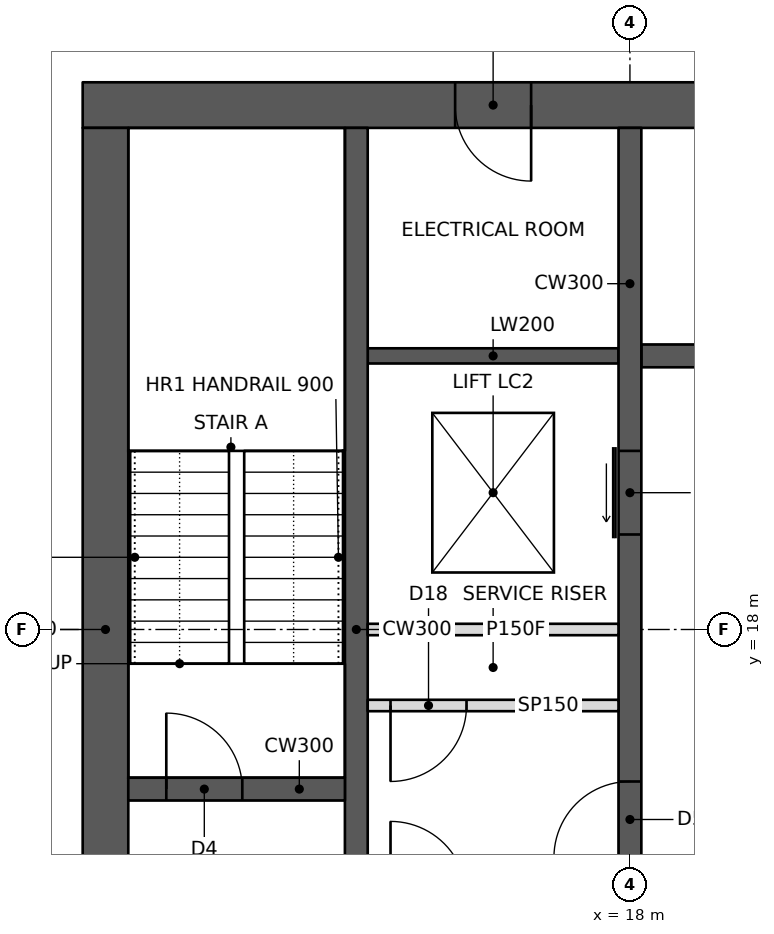
"""IFC4 building model, lengths in metres.
Left out: names, types, materials, properties, quantities, classifications, styles, units other than length and angle.
Written with IfcOpenShell. Run it as: python <this file> out.ifc"""

import sys

from ifc_helpers import new_model, si_unit, direction, frame, frame_2d, origin, place, context, subcontext, project, spatial, rectangle, extrude, element, fill, save


model = new_model("IFC4")
c1 = context("Model", 3, precision=1e-05, world=origin(), true_north=direction((0.0, 1.0)))
c2 = subcontext(c1, "Body", "Model", "MODEL_VIEW")
j1 = project(units=[si_unit("LENGTHUNIT", "METRE"), si_unit("PLANEANGLEUNIT", "RADIAN")], contexts=[c1])
p1 = place(None, origin())
s1 = spatial("IfcSite", under=j1, at=p1, CompositionType="ELEMENT")
p2 = place(p1, origin())
s2 = spatial("IfcBuilding", under=s1, at=p2, CompositionType="ELEMENT")
p3 = place(p2, frame((0.0, 0.0, 237.4)))
s3 = spatial("IfcBuildingStorey", under=s2, at=p3, CompositionType="ELEMENT", Elevation=237.4)
p4 = place(p3, frame((10.8, 24.9, 0.0), z_axis=(0.0, 0.0, 1.0), x_axis=(1.0, 0.0, 0.0)))
e1 = element("IfcWall", 1, at=p4, inside=s3, PredefinedType="SHEAR", context=c2, shape_type="SweptSolid", body=[
    extrude(rectangle(XDim=23.4, YDim=0.6, at=frame_2d((11.7, 0.0))), origin(), (0.0, 0.0, 1.0), 3.6),
])
p5 = place(p4, frame((17.2, 0.0, 0.0)))
e2 = element("IfcOpeningElement", 2, at=p5, cuts=e1, PredefinedType="OPENING", context=c2, shape_type="SweptSolid", body=[
    extrude(rectangle(XDim=1.8, YDim=2.1, at=frame_2d((0.9, 1.05))), frame((0.0, 0.31, 0.0), z_axis=(0.0, -1.0, 0.0), x_axis=(1.0, 0.0, 0.0)), (0.0, 0.0, 1.0), 0.62),
])
p6 = place(p4, frame((21.1, 0.0, 0.0)))
e3 = element("IfcOpeningElement", 3, at=p6, cuts=e1, PredefinedType="OPENING", context=c2, shape_type="SweptSolid", body=[
    extrude(rectangle(XDim=1.0, YDim=2.1, at=frame_2d((0.5, 1.05))), frame((0.0, 0.31, 0.0), z_axis=(0.0, -1.0, 0.0), x_axis=(1.0, 0.0, 0.0)), (0.0, 0.0, 1.0), 0.62),
])
p7 = place(p4, frame((4.9, 0.0, 0.0)))
e4 = element("IfcOpeningElement", 4, at=p7, cuts=e1, PredefinedType="OPENING", context=c2, shape_type="SweptSolid", body=[
    extrude(rectangle(XDim=1.0, YDim=2.1, at=frame_2d((0.5, 1.05))), frame((0.0, 0.31, 0.0), z_axis=(0.0, -1.0, 0.0), x_axis=(1.0, 0.0, 0.0)), (0.0, 0.0, 1.0), 0.62),
])
p8 = place(p3, frame((11.1, 11.4, 0.0), z_axis=(0.0, 0.0, 1.0), x_axis=(0.0, 1.0, 0.0)))
e5 = element("IfcWall", 5, at=p8, inside=s3, PredefinedType="SHEAR", context=c2, shape_type="SweptSolid", body=[
    extrude(rectangle(XDim=13.2, YDim=0.6, at=frame_2d((6.6, 0.0))), origin(), (0.0, 0.0, 1.0), 3.6),
])
p9 = place(p3, frame((14.4, 11.4, 0.0), z_axis=(0.0, 0.0, 1.0), x_axis=(0.0, 1.0, 0.0)))
e6 = element("IfcWall", 6, at=p9, inside=s3, PredefinedType="SHEAR", context=c2, shape_type="SweptSolid", body=[
    extrude(rectangle(XDim=13.2, YDim=0.3, at=frame_2d((6.6, 0.0))), origin(), (0.0, 0.0, 1.0), 3.6),
])
p10 = place(p3, frame((11.4, 15.9, 0.0), z_axis=(0.0, 0.0, 1.0), x_axis=(1.0, 0.0, 0.0)))
e7 = element("IfcWall", 7, at=p10, inside=s3, PredefinedType="SHEAR", context=c2, shape_type="SweptSolid", body=[
    extrude(rectangle(XDim=2.85, YDim=0.3, at=frame_2d((1.425, 0.0))), origin(), (0.0, 0.0, 1.0), 3.6),
])
p11 = place(p10, frame((0.5, 0.0, 0.0)))
e8 = element("IfcOpeningElement", 8, at=p11, cuts=e7, PredefinedType="OPENING", context=c2, shape_type="SweptSolid", body=[
    extrude(rectangle(XDim=1.0, YDim=2.1, at=frame_2d((0.5, 1.05))), frame((0.0, 0.16, 0.0), z_axis=(0.0, -1.0, 0.0), x_axis=(1.0, 0.0, 0.0)), (0.0, 0.0, 1.0), 0.32),
])
p12 = place(p3, frame((18.0, 11.4, 0.0), z_axis=(0.0, 0.0, 1.0), x_axis=(0.0, 1.0, 0.0)))
e9 = element("IfcWall", 9, at=p12, inside=s3, PredefinedType="SHEAR", context=c2, shape_type="SweptSolid", body=[
    extrude(rectangle(XDim=13.2, YDim=0.3, at=frame_2d((6.6, 0.0))), origin(), (0.0, 0.0, 1.0), 3.6),
])
p13 = place(p12, frame((3.6, 0.0, 0.0)))
e10 = element("IfcOpeningElement", 10, at=p13, cuts=e9, PredefinedType="OPENING", context=c2, shape_type="SweptSolid", body=[
    extrude(rectangle(XDim=1.0, YDim=2.1, at=frame_2d((0.5, 1.05))), frame((0.0, 0.16, 0.0), z_axis=(0.0, -1.0, 0.0), x_axis=(1.0, 0.0, 0.0)), (0.0, 0.0, 1.0), 0.32),
])
p14 = place(p12, frame((7.85, 0.0, 0.0)))
e11 = element("IfcOpeningElement", 11, at=p14, cuts=e9, PredefinedType="OPENING", context=c2, shape_type="SweptSolid", body=[
    extrude(rectangle(XDim=1.1, YDim=2.1, at=frame_2d((0.55, 1.05))), frame((0.0, 0.16, 0.0), z_axis=(0.0, -1.0, 0.0), x_axis=(1.0, 0.0, 0.0)), (0.0, 0.0, 1.0), 0.32),
])
p15 = place(p3, frame((14.55, 18.0, 0.0), z_axis=(0.0, 0.0, 1.0), x_axis=(1.0, 0.0, 0.0)))
e12 = element("IfcWall", 12, at=p15, inside=s3, PredefinedType="PARTITIONING", context=c2, shape_type="SweptSolid", body=[
    extrude(rectangle(XDim=3.3, YDim=0.15, at=frame_2d((1.65, 0.0))), origin(), (0.0, 0.0, 1.0), 3.4),
])
p16 = place(p3, frame((18.15, 21.6, 0.0), z_axis=(0.0, 0.0, 1.0), x_axis=(1.0, 0.0, 0.0)))
e13 = element("IfcWall", 13, at=p16, inside=s3, PredefinedType="SHEAR", context=c2, shape_type="SweptSolid", body=[
    extrude(rectangle(XDim=9.0, YDim=0.3, at=frame_2d((4.5, 0.0))), origin(), (0.0, 0.0, 1.0), 3.6),
])
p17 = place(p16, frame((6.75, 0.0, 0.0)))
e14 = element("IfcOpeningElement", 14, at=p17, cuts=e13, PredefinedType="OPENING", context=c2, shape_type="SweptSolid", body=[
    extrude(rectangle(XDim=1.2, YDim=2.1, at=frame_2d((0.6, 1.05))), frame((0.0, 0.16, 0.0), z_axis=(0.0, -1.0, 0.0), x_axis=(1.0, 0.0, 0.0)), (0.0, 0.0, 1.0), 0.32),
])
p18 = place(p16, frame((0.8, 0.0, 0.0)))
e15 = element("IfcOpeningElement", 15, at=p18, cuts=e13, PredefinedType="OPENING", context=c2, shape_type="SweptSolid", body=[
    extrude(rectangle(XDim=1.1, YDim=2.1, at=frame_2d((0.55, 1.05))), frame((0.0, 0.16, 0.0), z_axis=(0.0, -1.0, 0.0), x_axis=(1.0, 0.0, 0.0)), (0.0, 0.0, 1.0), 0.32),
])
p19 = place(p16, frame((3.8, 0.0, 0.0)))
e16 = element("IfcOpeningElement", 16, at=p19, cuts=e13, PredefinedType="OPENING", context=c2, shape_type="SweptSolid", body=[
    extrude(rectangle(XDim=1.1, YDim=2.1, at=frame_2d((0.55, 1.05))), frame((0.0, 0.16, 0.0), z_axis=(0.0, -1.0, 0.0), x_axis=(1.0, 0.0, 0.0)), (0.0, 0.0, 1.0), 0.32),
])
p20 = place(p3, frame((14.55, 21.6, 0.0), z_axis=(0.0, 0.0, 1.0), x_axis=(1.0, 0.0, 0.0)))
e17 = element("IfcWall", 17, at=p20, inside=s3, PredefinedType="SHEAR", context=c2, shape_type="SweptSolid", body=[
    extrude(rectangle(XDim=3.3, YDim=0.2, at=frame_2d((1.65, 0.0))), origin(), (0.0, 0.0, 1.0), 3.6),
])
p21 = place(p3, frame((14.55, 17.0, 0.0), z_axis=(0.0, 0.0, 1.0), x_axis=(1.0, 0.0, 0.0)))
e18 = element("IfcWall", 18, at=p21, inside=s3, PredefinedType="PARTITIONING", context=c2, shape_type="SweptSolid", body=[
    extrude(rectangle(XDim=3.3, YDim=0.15, at=frame_2d((1.65, 0.0))), origin(), (0.0, 0.0, 1.0), 3.4),
])
p22 = place(p21, frame((0.3, 0.0, 0.0)))
e19 = element("IfcOpeningElement", 19, at=p22, cuts=e18, PredefinedType="OPENING", context=c2, shape_type="SweptSolid", body=[
    extrude(rectangle(XDim=1.0, YDim=2.1, at=frame_2d((0.5, 1.05))), frame((0.0, 0.085, 0.0), z_axis=(0.0, -1.0, 0.0), x_axis=(1.0, 0.0, 0.0)), (0.0, 0.0, 1.0), 0.17),
])
p23 = place(p22, frame((1.0, 0.0, 0.0), z_axis=(0.0, 0.0, 1.0), x_axis=(-1.0, 0.0, 0.0)))
e20 = element("IfcDoor", 20, at=p23, inside=s3, OperationType="SINGLE_SWING_RIGHT", PredefinedType="DOOR", context=c2, shape_type="SweptSolid", body=[
    extrude(rectangle(XDim=1.0, YDim=2.1, at=frame_2d((0.5, 1.05))), frame((0.0, 0.025, 0.0), z_axis=(0.0, -1.0, 0.0), x_axis=(1.0, 0.0, 0.0)), (0.0, 0.0, 1.0), 0.05),
])
fill(e19, e20)
p24 = place(p11, origin())
e21 = element("IfcDoor", 21, at=p24, inside=s3, OperationType="SINGLE_SWING_LEFT", PredefinedType="DOOR", context=c2, shape_type="SweptSolid", body=[
    extrude(rectangle(XDim=1.0, YDim=2.1, at=frame_2d((0.5, 1.05))), frame((0.0, 0.025, 0.0), z_axis=(0.0, -1.0, 0.0), x_axis=(1.0, 0.0, 0.0)), (0.0, 0.0, 1.0), 0.05),
])
fill(e8, e21)
p25 = place(p13, origin())
e22 = element("IfcDoor", 22, at=p25, inside=s3, OperationType="SINGLE_SWING_LEFT", PredefinedType="DOOR", context=c2, shape_type="SweptSolid", body=[
    extrude(rectangle(XDim=1.0, YDim=2.1, at=frame_2d((0.5, 1.05))), frame((0.0, 0.025, 0.0), z_axis=(0.0, -1.0, 0.0), x_axis=(1.0, 0.0, 0.0)), (0.0, 0.0, 1.0), 0.05),
])
fill(e10, e22)
p26 = place(p7, frame((1.0, 0.0, 0.0), z_axis=(0.0, 0.0, 1.0), x_axis=(-1.0, 0.0, 0.0)))
e23 = element("IfcDoor", 23, at=p26, inside=s3, OperationType="SINGLE_SWING_LEFT", PredefinedType="DOOR", context=c2, shape_type="SweptSolid", body=[
    extrude(rectangle(XDim=1.0, YDim=2.1, at=frame_2d((0.5, 1.05))), frame((0.0, 0.025, 0.0), z_axis=(0.0, -1.0, 0.0), x_axis=(1.0, 0.0, 0.0)), (0.0, 0.0, 1.0), 0.05),
])
fill(e4, e23)
p27 = place(p14, origin())
e24 = element("IfcDoor", 24, at=p27, inside=s3, OperationType="SLIDING_TO_LEFT", PredefinedType="DOOR", context=c2, shape_type="SweptSolid", body=[
    extrude(rectangle(XDim=1.1, YDim=2.1, at=frame_2d((0.55, 1.05))), frame((0.0, 0.025, 0.0), z_axis=(0.0, -1.0, 0.0), x_axis=(1.0, 0.0, 0.0)), (0.0, 0.0, 1.0), 0.05),
])
fill(e11, e24)
save(model, sys.argv[1])
